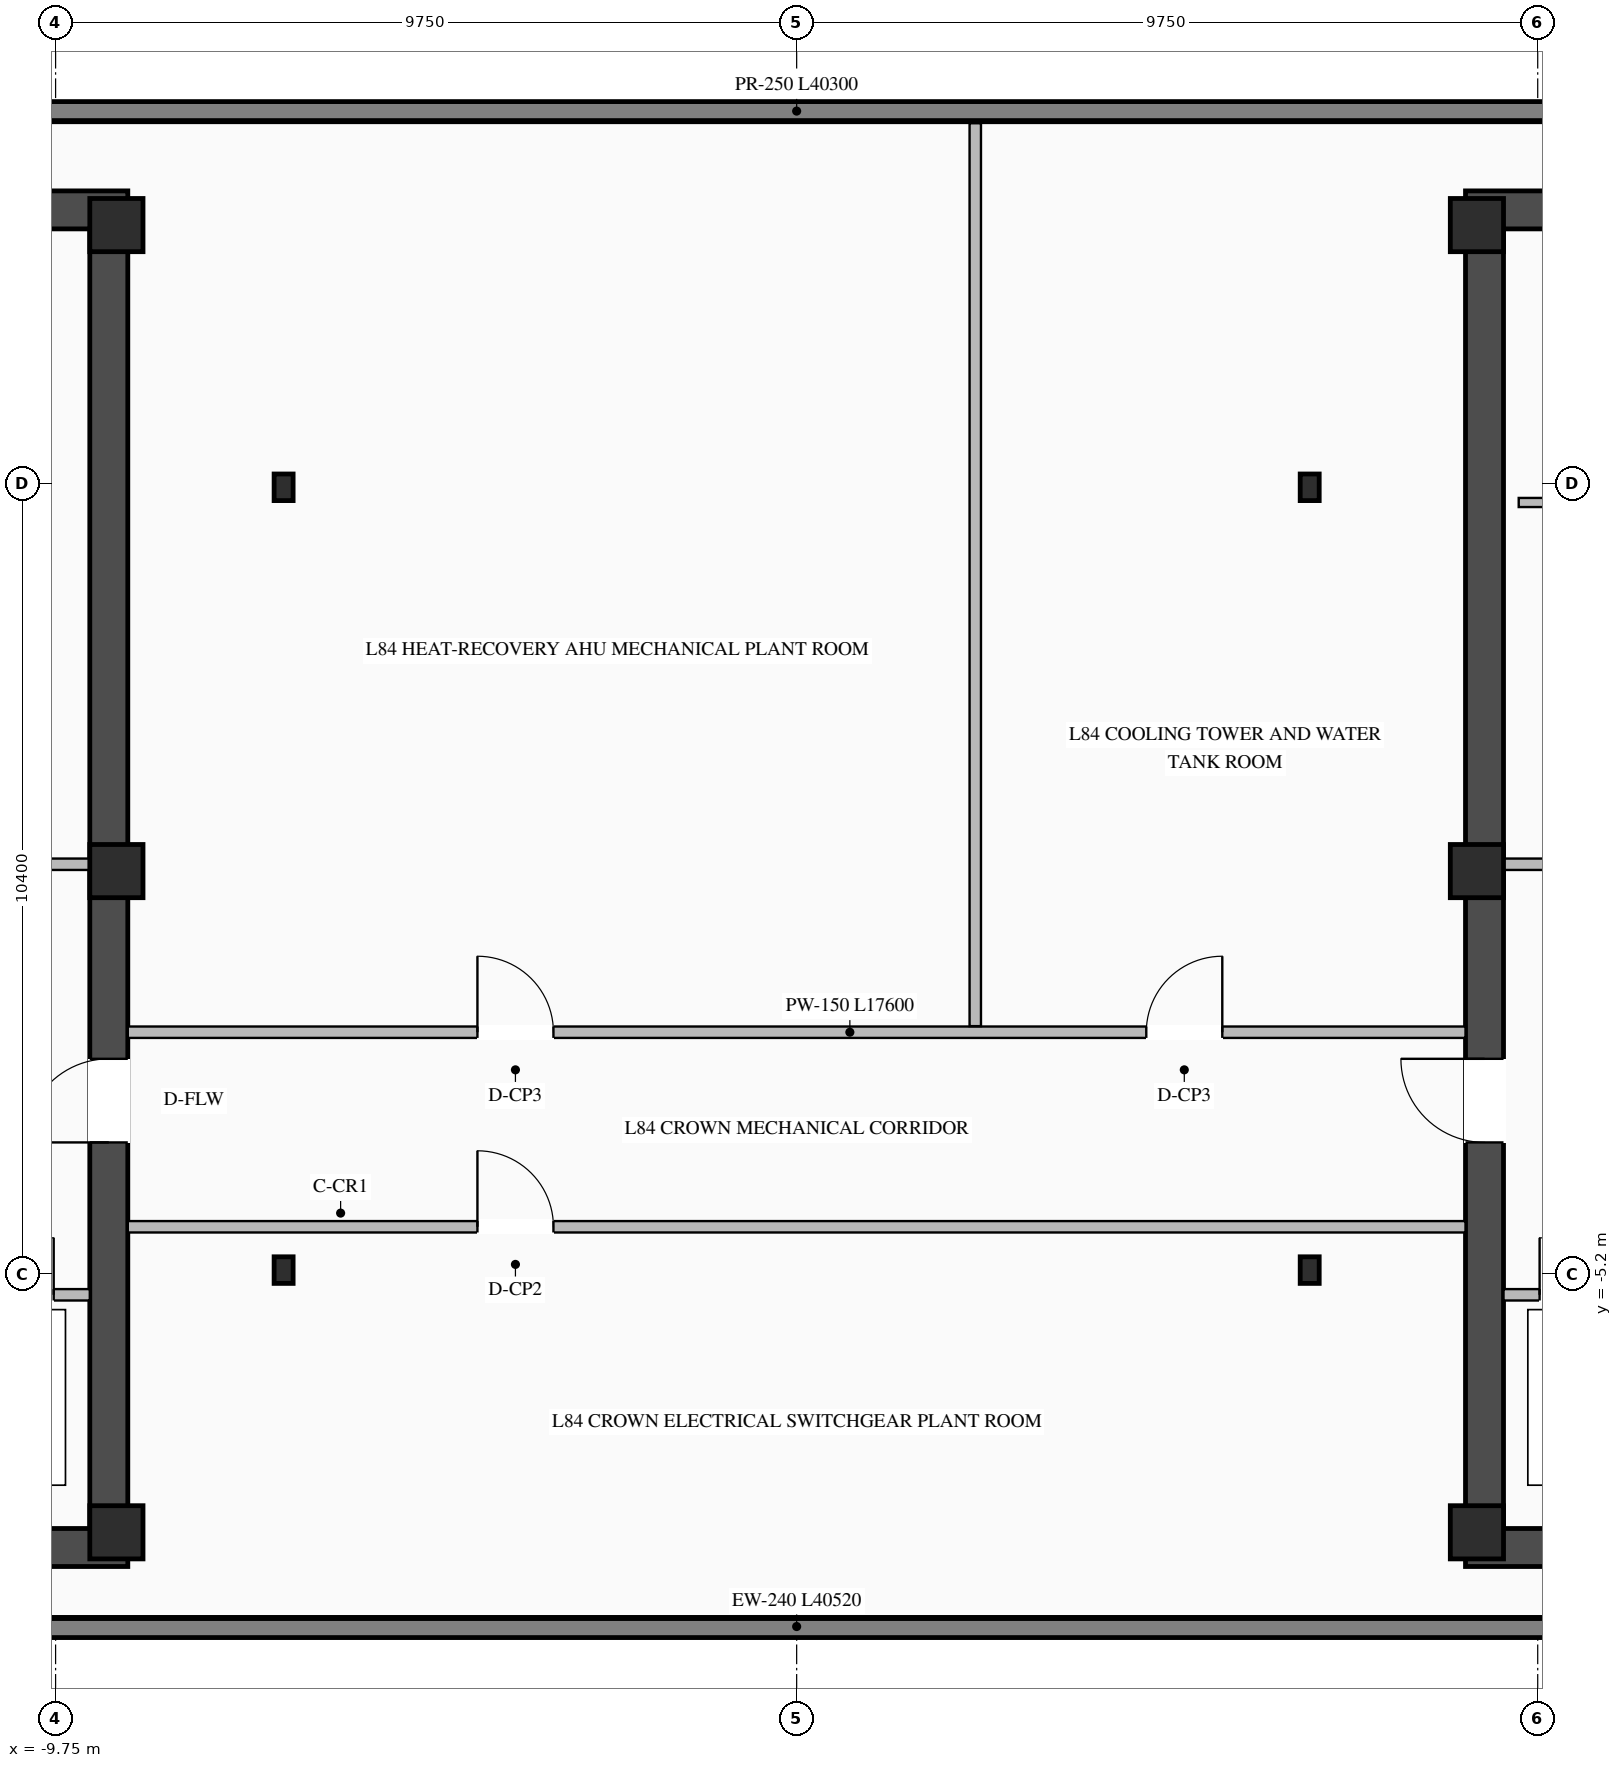
"""IFC4 building model, lengths in metres.
Left out: names, types, materials, properties, quantities, classifications, styles, units other than length and angle.
Written with IfcOpenShell. Run it as: python <this file> out.ifc"""

import sys

from ifc_helpers import new_model, si_unit, direction, frame, frame_2d, origin, origin_2d, place, context, subcontext, project, spatial, rectangle, i_section, extrude, element, fill, save


model = new_model("IFC4")
c1 = context("Model", 3, precision=1e-05, world=origin(), true_north=direction((0.0, 1.0)))
c2 = subcontext(c1, "Body", "Model", "MODEL_VIEW")
j1 = project(units=[si_unit("LENGTHUNIT", "METRE"), si_unit("PLANEANGLEUNIT", "RADIAN")], contexts=[c1])
p1 = place(None, origin())
s1 = spatial("IfcSite", under=j1, at=p1, CompositionType="ELEMENT")
p2 = place(p1, origin())
s2 = spatial("IfcBuilding", under=s1, at=p2, CompositionType="ELEMENT")
p3 = place(p2, frame((0.0, 0.0, 308.55)))
s3 = spatial("IfcBuildingStorey", under=s2, at=p3, CompositionType="ELEMENT", Elevation=308.55)
for number, where, z_axis, x_axis in (
    (1, (-19.05, -8.8, 0.0), (0.0, 0.0, 1.0), (1.0, 0.0, 0.0)),
    (2, (-19.05, 8.8, 0.0), (0.0, 0.0, 1.0), (1.0, 0.0, 0.0)),
):
    element("IfcWall", number, at=place(p3, frame(where, z_axis=z_axis, x_axis=x_axis)), inside=s3, PredefinedType="SHEAR", context=c2, shape_type="SweptSolid", body=[
        extrude(rectangle(XDim=10.25, YDim=0.5, at=frame_2d((5.125, 0.0))), origin(), (0.0, 0.0, 1.0), 3.71),
    ])
p4 = place(p3, frame((-9.05, -8.55, 0.0), z_axis=(0.0, 0.0, 1.0), x_axis=(0.0, 1.0, 0.0)))
e3 = element("IfcWall", 3, at=p4, inside=s3, PredefinedType="SHEAR", context=c2, shape_type="SweptSolid", body=[
    extrude(rectangle(XDim=17.1, YDim=0.5, at=frame_2d((8.55, 0.0))), origin(), (0.0, 0.0, 1.0), 3.71),
])
p5 = place(p4, frame((5.08, 0.0, 0.0)))
e4 = element("IfcOpeningElement", 4, at=p5, cuts=e3, PredefinedType="OPENING", context=c2, shape_type="SweptSolid", body=[
    extrude(rectangle(XDim=1.1, YDim=2.08, at=frame_2d((0.55, 1.04))), frame((0.0, 0.26, 0.0), z_axis=(0.0, -1.0, 0.0), x_axis=(1.0, 0.0, 0.0)), (0.0, 0.0, 1.0), 0.52),
])
for number, where, z_axis, x_axis in (
    (5, (8.8, -8.8, 0.0), (0.0, 0.0, 1.0), (1.0, 0.0, 0.0)),
    (6, (8.8, 8.8, 0.0), (0.0, 0.0, 1.0), (1.0, 0.0, 0.0)),
):
    element("IfcWall", number, at=place(p3, frame(where, z_axis=z_axis, x_axis=x_axis)), inside=s3, PredefinedType="SHEAR", context=c2, shape_type="SweptSolid", body=[
        extrude(rectangle(XDim=10.25, YDim=0.5, at=frame_2d((5.125, 0.0))), origin(), (0.0, 0.0, 1.0), 3.71),
    ])
p6 = place(p3, frame((9.05, -8.55, 0.0), z_axis=(0.0, 0.0, 1.0), x_axis=(0.0, 1.0, 0.0)))
e7 = element("IfcWall", 7, at=p6, inside=s3, PredefinedType="SHEAR", context=c2, shape_type="SweptSolid", body=[
    extrude(rectangle(XDim=17.1, YDim=0.5, at=frame_2d((8.55, 0.0))), origin(), (0.0, 0.0, 1.0), 3.71),
])
p7 = place(p6, frame((5.08, 0.0, 0.0)))
e8 = element("IfcOpeningElement", 8, at=p7, cuts=e7, PredefinedType="OPENING", context=c2, shape_type="SweptSolid", body=[
    extrude(rectangle(XDim=1.1, YDim=2.08, at=frame_2d((0.55, 1.04))), frame((0.0, 0.26, 0.0), z_axis=(0.0, -1.0, 0.0), x_axis=(1.0, 0.0, 0.0)), (0.0, 0.0, 1.0), 0.52),
])
for number, where, z_axis, x_axis in (
    (9, (-8.95, -8.6, 0.0), (0.0, 0.0, 1.0), (1.0, 0.0, 0.0)),
    (10, (-8.95, 0.1, 0.0), (0.0, 0.0, 1.0), (1.0, 0.0, 0.0)),
    (11, (-8.95, 8.6, 0.0), (0.0, 0.0, 1.0), (1.0, 0.0, 0.0)),
    (12, (8.95, -8.6, 0.0), (0.0, 0.0, 1.0), (1.0, 0.0, 0.0)),
    (13, (8.95, 0.1, 0.0), (0.0, 0.0, 1.0), (1.0, 0.0, 0.0)),
    (14, (8.95, 8.6, 0.0), (0.0, 0.0, 1.0), (1.0, 0.0, 0.0)),
):
    element("IfcColumn", number, at=place(p3, frame(where, z_axis=z_axis, x_axis=x_axis)), inside=s3, PredefinedType="COLUMN", context=c2, shape_type="SweptSolid", body=[
        extrude(rectangle(XDim=0.7, YDim=0.7, at=origin_2d()), origin(), (0.0, 0.0, 1.0), 3.95),
    ])
for number, where, z_axis, x_axis in (
    (15, (-6.75, -5.15, 0.0), (0.0, 0.0, 1.0), (1.0, 0.0, 0.0)),
    (16, (-6.75, 5.15, 0.0), (0.0, 0.0, 1.0), (1.0, 0.0, 0.0)),
    (17, (6.75, -5.15, 0.0), (0.0, 0.0, 1.0), (1.0, 0.0, 0.0)),
    (18, (6.75, 5.15, 0.0), (0.0, 0.0, 1.0), (1.0, 0.0, 0.0)),
):
    element("IfcColumn", number, at=place(p3, frame(where, z_axis=z_axis, x_axis=x_axis)), inside=s3, PredefinedType="COLUMN", context=c2, shape_type="SweptSolid", body=[
        extrude(i_section(OverallWidth=0.25, OverallDepth=0.35, WebThickness=0.01, FlangeThickness=0.012, at=origin_2d()), origin(), (0.0, 0.0, 1.0), 3.95),
    ])
for number, where, z_axis, x_axis in (
    (19, (-20.26, -9.84, 0.0), (0.0, 0.0, 1.0), (1.0, 0.0, 0.0)),
    (20, (20.26, 10.08, 0.0), (0.0, 0.0, 1.0), (-1.0, 0.0, 0.0)),
):
    element("IfcWall", number, at=place(p3, frame(where, z_axis=z_axis, x_axis=x_axis)), inside=s3, PredefinedType="STANDARD", context=c2, shape_type="SweptSolid", body=[
        extrude(rectangle(XDim=40.52, YDim=0.24, at=frame_2d((20.26, 0.0))), origin(), (0.0, 0.0, 1.0), 3.69),
    ])
for number, where, z_axis, x_axis in (
    (21, (-20.15, 10.1, 3.95), (0.0, 0.0, 1.0), (1.0, 0.0, 0.0)),
    (22, (20.15, -9.86, 3.95), (0.0, 0.0, 1.0), (-1.0, 0.0, 0.0)),
):
    element("IfcWall", number, at=place(p3, frame(where, z_axis=z_axis, x_axis=x_axis)), inside=s3, PredefinedType="PARAPET", context=c2, shape_type="SweptSolid", body=[
        extrude(rectangle(XDim=40.3, YDim=0.25, at=frame_2d((20.15, 0.0))), origin(), (0.0, 0.0, 1.0), 1.2),
    ])
p8 = place(p3, frame((-12.895, -5.475, 0.0), z_axis=(0.0, 0.0, 1.0), x_axis=(1.0, 0.0, 0.0)))
e23 = element("IfcWall", 23, at=p8, inside=s3, PredefinedType="STANDARD", context=c2, shape_type="SweptSolid", body=[
    extrude(rectangle(XDim=3.595, YDim=0.15, at=frame_2d((1.797, 0.0))), origin(), (0.0, 0.0, 1.0), 3.69),
])
p9 = place(p8, frame((0.42, 0.0, 0.0)))
e24 = element("IfcOpeningElement", 24, at=p9, cuts=e23, PredefinedType="OPENING", context=c2, shape_type="SweptSolid", body=[
    extrude(rectangle(XDim=1.1, YDim=2.15, at=frame_2d((0.55, 1.075))), frame((0.0, 0.085, 0.0), z_axis=(0.0, -1.0, 0.0), x_axis=(1.0, 0.0, 0.0)), (0.0, 0.0, 1.0), 0.17),
])
p10 = place(p8, frame((2.37, 0.0, 0.0)))
e25 = element("IfcOpeningElement", 25, at=p10, cuts=e23, PredefinedType="OPENING", context=c2, shape_type="SweptSolid", body=[
    extrude(rectangle(XDim=0.75, YDim=2.05, at=frame_2d((0.375, 1.025))), frame((0.0, 0.085, 0.0), z_axis=(0.0, -1.0, 0.0), x_axis=(1.0, 0.0, 0.0)), (0.0, 0.0, 1.0), 0.17),
])
p11 = place(p3, frame((-12.89, 0.19, 0.0), z_axis=(0.0, 0.0, 1.0), x_axis=(1.0, 0.0, 0.0)))
e26 = element("IfcWall", 26, at=p11, inside=s3, PredefinedType="STANDARD", context=c2, shape_type="SweptSolid", body=[
    extrude(rectangle(XDim=3.59, YDim=0.15, at=frame_2d((1.795, 0.0))), origin(), (0.0, 0.0, 1.0), 3.185),
])
p12 = place(p11, frame((0.415, 0.0, 0.0)))
e27 = element("IfcOpeningElement", 27, at=p12, cuts=e26, PredefinedType="OPENING", context=c2, shape_type="SweptSolid", body=[
    extrude(rectangle(XDim=0.85, YDim=2.04, at=frame_2d((0.425, 1.02))), frame((0.0, 0.085, 0.0), z_axis=(0.0, -1.0, 0.0), x_axis=(1.0, 0.0, 0.0)), (0.0, 0.0, 1.0), 0.17),
])
p13 = place(p3, frame((9.3, -5.475, 0.0), z_axis=(0.0, 0.0, 1.0), x_axis=(1.0, 0.0, 0.0)))
e28 = element("IfcWall", 28, at=p13, inside=s3, PredefinedType="STANDARD", context=c2, shape_type="SweptSolid", body=[
    extrude(rectangle(XDim=3.595, YDim=0.15, at=frame_2d((1.797, 0.0))), origin(), (0.0, 0.0, 1.0), 3.69),
])
p14 = place(p13, frame((2.075, 0.0, 0.0)))
e29 = element("IfcOpeningElement", 29, at=p14, cuts=e28, PredefinedType="OPENING", context=c2, shape_type="SweptSolid", body=[
    extrude(rectangle(XDim=1.1, YDim=2.15, at=frame_2d((0.55, 1.075))), frame((0.0, 0.085, 0.0), z_axis=(0.0, -1.0, 0.0), x_axis=(1.0, 0.0, 0.0)), (0.0, 0.0, 1.0), 0.17),
])
p15 = place(p13, frame((0.475, 0.0, 0.0)))
e30 = element("IfcOpeningElement", 30, at=p15, cuts=e28, PredefinedType="OPENING", context=c2, shape_type="SweptSolid", body=[
    extrude(rectangle(XDim=0.75, YDim=2.05, at=frame_2d((0.375, 1.025))), frame((0.0, 0.085, 0.0), z_axis=(0.0, -1.0, 0.0), x_axis=(1.0, 0.0, 0.0)), (0.0, 0.0, 1.0), 0.17),
])
p16 = place(p3, frame((9.3, 0.19, 0.0), z_axis=(0.0, 0.0, 1.0), x_axis=(1.0, 0.0, 0.0)))
e31 = element("IfcWall", 31, at=p16, inside=s3, PredefinedType="STANDARD", context=c2, shape_type="SweptSolid", body=[
    extrude(rectangle(XDim=3.59, YDim=0.15, at=frame_2d((1.795, 0.0))), origin(), (0.0, 0.0, 1.0), 3.185),
])
p17 = place(p16, frame((2.325, 0.0, 0.0)))
e32 = element("IfcOpeningElement", 32, at=p17, cuts=e31, PredefinedType="OPENING", context=c2, shape_type="SweptSolid", body=[
    extrude(rectangle(XDim=0.85, YDim=2.04, at=frame_2d((0.425, 1.02))), frame((0.0, 0.085, 0.0), z_axis=(0.0, -1.0, 0.0), x_axis=(1.0, 0.0, 0.0)), (0.0, 0.0, 1.0), 0.17),
])
p18 = place(p3, frame((9.5, 4.95, 0.0), z_axis=(0.0, 0.0, 1.0), x_axis=(1.0, 0.0, 0.0)))
e33 = element("IfcWall", 33, at=p18, inside=s3, PredefinedType="STANDARD", context=c2, shape_type="SweptSolid", body=[
    extrude(rectangle(XDim=1.55, YDim=0.12, at=frame_2d((0.775, 0.0))), origin(), (0.0, 0.0, 1.0), 3.69),
])
p19 = place(p3, frame((-8.8, -2.02, 0.0), z_axis=(0.0, 0.0, 1.0), x_axis=(1.0, 0.0, 0.0)))
e34 = element("IfcWall", 34, at=p19, inside=s3, PredefinedType="STANDARD", context=c2, shape_type="SweptSolid", body=[
    extrude(rectangle(XDim=17.6, YDim=0.15, at=frame_2d((8.8, 0.0))), origin(), (0.0, 0.0, 1.0), 3.69),
])
p20 = place(p19, frame((4.6, 0.0, 0.0)))
e35 = element("IfcOpeningElement", 35, at=p20, cuts=e34, PredefinedType="OPENING", context=c2, shape_type="SweptSolid", body=[
    extrude(rectangle(XDim=1.0, YDim=2.02, at=frame_2d((0.5, 1.01))), frame((0.0, 0.085, 0.0), z_axis=(0.0, -1.0, 0.0), x_axis=(1.0, 0.0, 0.0)), (0.0, 0.0, 1.0), 0.17),
])
p21 = place(p19, frame((13.4, 0.0, 0.0)))
e36 = element("IfcOpeningElement", 36, at=p21, cuts=e34, PredefinedType="OPENING", context=c2, shape_type="SweptSolid", body=[
    extrude(rectangle(XDim=1.0, YDim=2.02, at=frame_2d((0.5, 1.01))), frame((0.0, 0.085, 0.0), z_axis=(0.0, -1.0, 0.0), x_axis=(1.0, 0.0, 0.0)), (0.0, 0.0, 1.0), 0.17),
])
p22 = place(p3, frame((2.35, -1.94, 0.0), z_axis=(0.0, 0.0, 1.0), x_axis=(0.0, 1.0, 0.0)))
e37 = element("IfcWall", 37, at=p22, inside=s3, PredefinedType="STANDARD", context=c2, shape_type="SweptSolid", body=[
    extrude(rectangle(XDim=11.88, YDim=0.15, at=frame_2d((5.94, 0.0))), origin(), (0.0, 0.0, 1.0), 3.69),
])
p23 = place(p3, frame((-8.8, -4.58, 0.0), z_axis=(0.0, 0.0, 1.0), x_axis=(1.0, 0.0, 0.0)))
e38 = element("IfcWall", 38, at=p23, inside=s3, PredefinedType="STANDARD", context=c2, shape_type="SweptSolid", body=[
    extrude(rectangle(XDim=17.6, YDim=0.15, at=frame_2d((8.8, 0.0))), origin(), (0.0, 0.0, 1.0), 3.69),
])
p24 = place(p23, frame((4.6, 0.0, 0.0)))
e39 = element("IfcOpeningElement", 39, at=p24, cuts=e38, PredefinedType="OPENING", context=c2, shape_type="SweptSolid", body=[
    extrude(rectangle(XDim=1.0, YDim=2.02, at=frame_2d((0.5, 1.01))), frame((0.0, 0.085, 0.0), z_axis=(0.0, -1.0, 0.0), x_axis=(1.0, 0.0, 0.0)), (0.0, 0.0, 1.0), 0.17),
])
p25 = place(p10, origin())
e40 = element("IfcDoor", 40, at=p25, inside=s3, OperationType="SINGLE_SWING_RIGHT", PredefinedType="DOOR", context=c2, shape_type="SweptSolid", body=[
    extrude(rectangle(XDim=0.75, YDim=2.05, at=frame_2d((0.375, 1.025))), frame((0.0, 0.025, 0.0), z_axis=(0.0, -1.0, 0.0), x_axis=(1.0, 0.0, 0.0)), (0.0, 0.0, 1.0), 0.05),
])
fill(e25, e40)
p26 = place(p5, origin())
e41 = element("IfcDoor", 41, at=p26, inside=s3, OperationType="SINGLE_SWING_LEFT", PredefinedType="DOOR", context=c2, shape_type="SweptSolid", body=[
    extrude(rectangle(XDim=1.1, YDim=2.08, at=frame_2d((0.55, 1.04))), frame((0.0, 0.205, 0.0), z_axis=(0.0, -1.0, 0.0), x_axis=(1.0, 0.0, 0.0)), (0.0, 0.0, 1.0), 0.05),
])
fill(e4, e41)
p27 = place(p15, origin())
e42 = element("IfcDoor", 42, at=p27, inside=s3, OperationType="SINGLE_SWING_LEFT", PredefinedType="DOOR", context=c2, shape_type="SweptSolid", body=[
    extrude(rectangle(XDim=0.75, YDim=2.05, at=frame_2d((0.375, 1.025))), frame((0.0, 0.025, 0.0), z_axis=(0.0, -1.0, 0.0), x_axis=(1.0, 0.0, 0.0)), (0.0, 0.0, 1.0), 0.05),
])
fill(e30, e42)
p28 = place(p7, origin())
e43 = element("IfcDoor", 43, at=p28, inside=s3, OperationType="SINGLE_SWING_RIGHT", PredefinedType="DOOR", context=c2, shape_type="SweptSolid", body=[
    extrude(rectangle(XDim=1.1, YDim=2.08, at=frame_2d((0.55, 1.04))), frame((0.0, -0.155, 0.0), z_axis=(0.0, -1.0, 0.0), x_axis=(1.0, 0.0, 0.0)), (0.0, 0.0, 1.0), 0.05),
])
fill(e8, e43)
p29 = place(p20, origin())
e44 = element("IfcDoor", 44, at=p29, inside=s3, OperationType="SINGLE_SWING_LEFT", PredefinedType="DOOR", context=c2, shape_type="SweptSolid", body=[
    extrude(rectangle(XDim=1.0, YDim=2.02, at=frame_2d((0.5, 1.01))), frame((0.0, 0.025, 0.0), z_axis=(0.0, -1.0, 0.0), x_axis=(1.0, 0.0, 0.0)), (0.0, 0.0, 1.0), 0.05),
])
fill(e35, e44)
p30 = place(p21, origin())
e45 = element("IfcDoor", 45, at=p30, inside=s3, OperationType="SINGLE_SWING_RIGHT", PredefinedType="DOOR", context=c2, shape_type="SweptSolid", body=[
    extrude(rectangle(XDim=1.0, YDim=2.02, at=frame_2d((0.5, 1.01))), frame((0.0, 0.025, 0.0), z_axis=(0.0, -1.0, 0.0), x_axis=(1.0, 0.0, 0.0)), (0.0, 0.0, 1.0), 0.05),
])
fill(e36, e45)
p31 = place(p24, origin())
e46 = element("IfcDoor", 46, at=p31, inside=s3, OperationType="SINGLE_SWING_LEFT", PredefinedType="DOOR", context=c2, shape_type="SweptSolid", body=[
    extrude(rectangle(XDim=1.0, YDim=2.02, at=frame_2d((0.5, 1.01))), frame((0.0, 0.025, 0.0), z_axis=(0.0, -1.0, 0.0), x_axis=(1.0, 0.0, 0.0)), (0.0, 0.0, 1.0), 0.05),
])
fill(e39, e46)
save(model, sys.argv[1])
